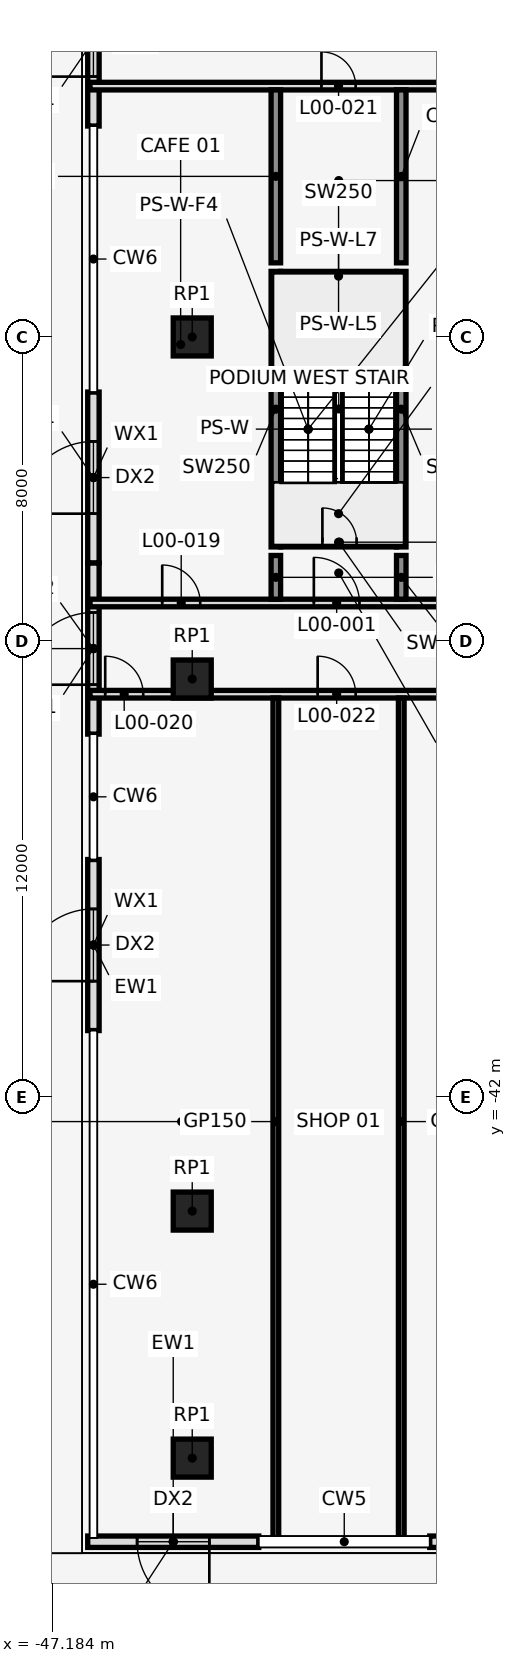
"""IFC4 building model, lengths in metres.
Left out: names, types, materials, properties, quantities, classifications, styles, units other than length and angle.
Written with IfcOpenShell. Run it as: python <this file> out.ifc"""

import sys

from ifc_helpers import new_model, si_unit, direction, frame, frame_2d, origin, origin_2d, place, context, subcontext, project, spatial, rectangle, extrude, element, fill, save


model = new_model("IFC4")
c1 = context("Model", 3, precision=1e-05, world=origin(), true_north=direction((0.0, 1.0)))
c2 = subcontext(c1, "Body", "Model", "MODEL_VIEW")
j1 = project(units=[si_unit("LENGTHUNIT", "METRE"), si_unit("PLANEANGLEUNIT", "RADIAN")], contexts=[c1])
p1 = place(None, origin())
s1 = spatial("IfcSite", under=j1, at=p1, CompositionType="ELEMENT")
p2 = place(p1, origin())
s2 = spatial("IfcBuilding", under=s1, at=p2, CompositionType="ELEMENT")
p3 = place(p2, origin())
s3 = spatial("IfcBuildingStorey", under=s2, at=p3, CompositionType="ELEMENT", Elevation=0.0)
for number, where, z_axis, x_axis in (
    (1, (-43.5, -22.0, 0.0), (0.0, 0.0, 1.0), (1.0, 0.0, 0.0)),
    (2, (-43.5, -31.0, 0.0), (0.0, 0.0, 1.0), (1.0, 0.0, 0.0)),
    (3, (-43.5, -45.0, 0.0), (0.0, 0.0, 1.0), (1.0, 0.0, 0.0)),
    (4, (-43.5, -51.5, 0.0), (0.0, 0.0, 1.0), (1.0, 0.0, 0.0)),
):
    element("IfcColumn", number, at=place(p3, frame(where, z_axis=z_axis, x_axis=x_axis)), inside=s3, PredefinedType="COLUMN", context=c2, shape_type="SweptSolid", body=[
        extrude(rectangle(XDim=1.0, YDim=1.0, at=origin_2d()), origin(), (0.0, 0.0, 1.0), 8.0),
    ])
p4 = place(p3, frame((-41.75, -53.7, 0.0), z_axis=(0.0, 0.0, 1.0), x_axis=(-1.0, 0.0, 0.0)))
e5 = element("IfcWall", 5, at=p4, inside=s3, PredefinedType="STANDARD", context=c2, shape_type="SweptSolid", body=[
    extrude(rectangle(XDim=4.5, YDim=0.3, at=frame_2d((2.25, 0.0))), origin(), (0.0, 0.0, 1.0), 7.7),
])
p5 = place(p4, frame((1.3, 0.0, 0.0)))
e6 = element("IfcOpeningElement", 6, at=p5, cuts=e5, PredefinedType="OPENING", context=c2, shape_type="SweptSolid", body=[
    extrude(rectangle(XDim=1.9, YDim=2.6, at=frame_2d((0.95, 1.3))), frame((0.0, 0.162, 0.0), z_axis=(0.0, -1.0, 0.0), x_axis=(1.0, 0.0, 0.0)), (0.0, 0.0, 1.0), 0.324),
])
p6 = place(p4, frame((1.3, 0.0, 3.3)))
e7 = element("IfcOpeningElement", 7, at=p6, cuts=e5, PredefinedType="OPENING", context=c2, shape_type="SweptSolid", body=[
    extrude(rectangle(XDim=1.9, YDim=3.0, at=frame_2d((0.95, 1.5))), frame((0.0, 0.162, 0.0), z_axis=(0.0, -1.0, 0.0), x_axis=(1.0, 0.0, 0.0)), (0.0, 0.0, 1.0), 0.324),
])
p7 = place(p3, frame((-32.75, -53.7, 0.0), z_axis=(0.0, 0.0, 1.0), x_axis=(-1.0, 0.0, 0.0)))
e8 = element("IfcWall", 8, at=p7, inside=s3, PredefinedType="STANDARD", context=c2, shape_type="SweptSolid", body=[
    extrude(rectangle(XDim=4.5, YDim=0.3, at=frame_2d((2.25, 0.0))), origin(), (0.0, 0.0, 1.0), 7.7),
])
p8 = place(p7, frame((1.3, 0.0, 0.0)))
e9 = element("IfcOpeningElement", 9, at=p8, cuts=e8, PredefinedType="OPENING", context=c2, shape_type="SweptSolid", body=[
    extrude(rectangle(XDim=1.9, YDim=2.6, at=frame_2d((0.95, 1.3))), frame((0.0, 0.162, 0.0), z_axis=(0.0, -1.0, 0.0), x_axis=(1.0, 0.0, 0.0)), (0.0, 0.0, 1.0), 0.324),
])
p9 = place(p7, frame((1.3, 0.0, 3.3)))
e10 = element("IfcOpeningElement", 10, at=p9, cuts=e8, PredefinedType="OPENING", context=c2, shape_type="SweptSolid", body=[
    extrude(rectangle(XDim=1.9, YDim=3.0, at=frame_2d((0.95, 1.5))), frame((0.0, 0.162, 0.0), z_axis=(0.0, -1.0, 0.0), x_axis=(1.0, 0.0, 0.0)), (0.0, 0.0, 1.0), 0.324),
])
p10 = place(p3, frame((-46.1, -16.45, 0.0), z_axis=(0.0, 0.0, 1.0), x_axis=(0.0, 1.0, 0.0)))
e11 = element("IfcWall", 11, at=p10, inside=s3, PredefinedType="STANDARD", context=c2, shape_type="SweptSolid", body=[
    extrude(rectangle(XDim=4.5, YDim=0.3, at=frame_2d((2.25, 0.0))), origin(), (0.0, 0.0, 1.0), 7.7),
])
p11 = place(p10, frame((1.3, 0.0, 0.0)))
e12 = element("IfcOpeningElement", 12, at=p11, cuts=e11, PredefinedType="OPENING", context=c2, shape_type="SweptSolid", body=[
    extrude(rectangle(XDim=1.9, YDim=2.6, at=frame_2d((0.95, 1.3))), frame((0.0, 0.162, 0.0), z_axis=(0.0, -1.0, 0.0), x_axis=(1.0, 0.0, 0.0)), (0.0, 0.0, 1.0), 0.324),
])
p12 = place(p10, frame((1.3, 0.0, 3.3)))
e13 = element("IfcOpeningElement", 13, at=p12, cuts=e11, PredefinedType="OPENING", context=c2, shape_type="SweptSolid", body=[
    extrude(rectangle(XDim=1.9, YDim=3.0, at=frame_2d((0.95, 1.5))), frame((0.0, 0.162, 0.0), z_axis=(0.0, -1.0, 0.0), x_axis=(1.0, 0.0, 0.0)), (0.0, 0.0, 1.0), 0.324),
])
p13 = place(p3, frame((-46.1, -27.95, 0.0), z_axis=(0.0, 0.0, 1.0), x_axis=(0.0, 1.0, 0.0)))
e14 = element("IfcWall", 14, at=p13, inside=s3, PredefinedType="STANDARD", context=c2, shape_type="SweptSolid", body=[
    extrude(rectangle(XDim=4.5, YDim=0.3, at=frame_2d((2.25, 0.0))), origin(), (0.0, 0.0, 1.0), 7.7),
])
p14 = place(p13, frame((1.3, 0.0, 0.0)))
e15 = element("IfcOpeningElement", 15, at=p14, cuts=e14, PredefinedType="OPENING", context=c2, shape_type="SweptSolid", body=[
    extrude(rectangle(XDim=1.9, YDim=2.6, at=frame_2d((0.95, 1.3))), frame((0.0, 0.162, 0.0), z_axis=(0.0, -1.0, 0.0), x_axis=(1.0, 0.0, 0.0)), (0.0, 0.0, 1.0), 0.324),
])
p15 = place(p13, frame((1.3, 0.0, 3.3)))
e16 = element("IfcOpeningElement", 16, at=p15, cuts=e14, PredefinedType="OPENING", context=c2, shape_type="SweptSolid", body=[
    extrude(rectangle(XDim=1.9, YDim=3.0, at=frame_2d((0.95, 1.5))), frame((0.0, 0.162, 0.0), z_axis=(0.0, -1.0, 0.0), x_axis=(1.0, 0.0, 0.0)), (0.0, 0.0, 1.0), 0.324),
])
p16 = place(p3, frame((-46.1, -32.45, 0.0), z_axis=(0.0, 0.0, 1.0), x_axis=(0.0, 1.0, 0.0)))
e17 = element("IfcWall", 17, at=p16, inside=s3, PredefinedType="STANDARD", context=c2, shape_type="SweptSolid", body=[
    extrude(rectangle(XDim=4.5, YDim=0.3, at=frame_2d((2.25, 0.0))), origin(), (0.0, 0.0, 1.0), 7.7),
])
p17 = place(p16, frame((1.3, 0.0, 0.0)))
e18 = element("IfcOpeningElement", 18, at=p17, cuts=e17, PredefinedType="OPENING", context=c2, shape_type="SweptSolid", body=[
    extrude(rectangle(XDim=1.9, YDim=2.6, at=frame_2d((0.95, 1.3))), frame((0.0, 0.162, 0.0), z_axis=(0.0, -1.0, 0.0), x_axis=(1.0, 0.0, 0.0)), (0.0, 0.0, 1.0), 0.324),
])
p18 = place(p16, frame((1.3, 0.0, 3.3)))
e19 = element("IfcOpeningElement", 19, at=p18, cuts=e17, PredefinedType="OPENING", context=c2, shape_type="SweptSolid", body=[
    extrude(rectangle(XDim=1.9, YDim=3.0, at=frame_2d((0.95, 1.5))), frame((0.0, 0.162, 0.0), z_axis=(0.0, -1.0, 0.0), x_axis=(1.0, 0.0, 0.0)), (0.0, 0.0, 1.0), 0.324),
])
p19 = place(p3, frame((-46.1, -40.25, 0.0), z_axis=(0.0, 0.0, 1.0), x_axis=(0.0, 1.0, 0.0)))
e20 = element("IfcWall", 20, at=p19, inside=s3, PredefinedType="STANDARD", context=c2, shape_type="SweptSolid", body=[
    extrude(rectangle(XDim=4.5, YDim=0.3, at=frame_2d((2.25, 0.0))), origin(), (0.0, 0.0, 1.0), 7.7),
])
p20 = place(p19, frame((1.3, 0.0, 0.0)))
e21 = element("IfcOpeningElement", 21, at=p20, cuts=e20, PredefinedType="OPENING", context=c2, shape_type="SweptSolid", body=[
    extrude(rectangle(XDim=1.9, YDim=2.6, at=frame_2d((0.95, 1.3))), frame((0.0, 0.162, 0.0), z_axis=(0.0, -1.0, 0.0), x_axis=(1.0, 0.0, 0.0)), (0.0, 0.0, 1.0), 0.324),
])
p21 = place(p19, frame((1.3, 0.0, 3.3)))
e22 = element("IfcOpeningElement", 22, at=p21, cuts=e20, PredefinedType="OPENING", context=c2, shape_type="SweptSolid", body=[
    extrude(rectangle(XDim=1.9, YDim=3.0, at=frame_2d((0.95, 1.5))), frame((0.0, 0.162, 0.0), z_axis=(0.0, -1.0, 0.0), x_axis=(1.0, 0.0, 0.0)), (0.0, 0.0, 1.0), 0.324),
])
for number, where, z_axis, x_axis in (
    (23, (-41.3, -27.525, 0.0), (0.0, 0.0, 1.0), (0.0, 1.0, 0.0)),
    (24, (-38.0, -27.525, 0.0), (0.0, 0.0, 1.0), (0.0, 1.0, 0.0)),
):
    element("IfcWall", number, at=place(p3, frame(where, z_axis=z_axis, x_axis=x_axis)), inside=s3, PredefinedType="SHEAR", context=c2, shape_type="SweptSolid", body=[
        extrude(rectangle(XDim=7.25, YDim=0.25, at=frame_2d((3.625, 0.0))), origin(), (0.0, 0.0, 1.0), 8.0),
    ])
p22 = place(p3, frame((-41.175, -27.4, 0.0), z_axis=(0.0, 0.0, 1.0), x_axis=(1.0, 0.0, 0.0)))
e25 = element("IfcWall", 25, at=p22, inside=s3, PredefinedType="SHEAR", context=c2, shape_type="SweptSolid", body=[
    extrude(rectangle(XDim=3.05, YDim=0.25, at=frame_2d((1.525, 0.0))), origin(), (0.0, 0.0, 1.0), 8.0),
])
p23 = place(p22, frame((1.1, 0.0, 0.0)))
e26 = element("IfcOpeningElement", 26, at=p23, cuts=e25, PredefinedType="OPENING", context=c2, shape_type="SweptSolid", body=[
    extrude(rectangle(XDim=0.9, YDim=2.1, at=frame_2d((0.45, 1.05))), frame((0.0, 0.137, 0.0), z_axis=(0.0, -1.0, 0.0), x_axis=(1.0, 0.0, 0.0)), (0.0, 0.0, 1.0), 0.274),
])
p24 = place(p3, frame((-41.175, -20.4, 0.0), z_axis=(0.0, 0.0, 1.0), x_axis=(1.0, 0.0, 0.0)))
e27 = element("IfcWall", 27, at=p24, inside=s3, PredefinedType="SHEAR", context=c2, shape_type="SweptSolid", body=[
    extrude(rectangle(XDim=3.05, YDim=0.25, at=frame_2d((1.525, 0.0))), origin(), (0.0, 0.0, 1.0), 8.0),
])
p25 = place(p3, frame((-46.19, -31.4, 0.0), z_axis=(0.0, 0.0, 1.0), x_axis=(1.0, 0.0, 0.0)))
e28 = element("IfcWall", 28, at=p25, inside=s3, PredefinedType="PARTITIONING", context=c2, shape_type="SweptSolid", body=[
    extrude(rectangle(XDim=26.59, YDim=0.2, at=frame_2d((13.295, 0.0))), origin(), (0.0, 0.0, 1.0), 7.7),
])
p26 = place(p25, frame((0.4, 0.0, 0.0)))
e29 = element("IfcOpeningElement", 29, at=p26, cuts=e28, PredefinedType="OPENING", context=c2, shape_type="SweptSolid", body=[
    extrude(rectangle(XDim=1.0, YDim=2.1, at=frame_2d((0.5, 1.05))), frame((0.0, 0.112, 0.0), z_axis=(0.0, -1.0, 0.0), x_axis=(1.0, 0.0, 0.0)), (0.0, 0.0, 1.0), 0.224),
])
p27 = place(p25, frame((5.99, 0.0, 0.0)))
e30 = element("IfcOpeningElement", 30, at=p27, cuts=e28, PredefinedType="OPENING", context=c2, shape_type="SweptSolid", body=[
    extrude(rectangle(XDim=1.0, YDim=2.1, at=frame_2d((0.5, 1.05))), frame((0.0, 0.112, 0.0), z_axis=(0.0, -1.0, 0.0), x_axis=(1.0, 0.0, 0.0)), (0.0, 0.0, 1.0), 0.224),
])
p28 = place(p25, frame((14.79, 0.0, 0.0)))
e31 = element("IfcOpeningElement", 31, at=p28, cuts=e28, PredefinedType="OPENING", context=c2, shape_type="SweptSolid", body=[
    extrude(rectangle(XDim=1.8, YDim=2.1, at=frame_2d((0.9, 1.05))), frame((0.0, 0.112, 0.0), z_axis=(0.0, -1.0, 0.0), x_axis=(1.0, 0.0, 0.0)), (0.0, 0.0, 1.0), 0.224),
])
p29 = place(p3, frame((-46.19, -29.0, 0.0), z_axis=(0.0, 0.0, 1.0), x_axis=(1.0, 0.0, 0.0)))
e32 = element("IfcWall", 32, at=p29, inside=s3, PredefinedType="PARTITIONING", context=c2, shape_type="SweptSolid", body=[
    extrude(rectangle(XDim=26.615, YDim=0.2, at=frame_2d((13.308, 0.0))), origin(), (0.0, 0.0, 1.0), 7.7),
])
p30 = place(p29, frame((5.89, 0.0, 0.0)))
e33 = element("IfcOpeningElement", 33, at=p30, cuts=e32, PredefinedType="OPENING", context=c2, shape_type="SweptSolid", body=[
    extrude(rectangle(XDim=1.2, YDim=2.1, at=frame_2d((0.6, 1.05))), frame((0.0, 0.112, 0.0), z_axis=(0.0, -1.0, 0.0), x_axis=(1.0, 0.0, 0.0)), (0.0, 0.0, 1.0), 0.224),
])
p31 = place(p29, frame((24.19, 0.0, 0.0)))
e34 = element("IfcOpeningElement", 34, at=p31, cuts=e32, PredefinedType="OPENING", context=c2, shape_type="SweptSolid", body=[
    extrude(rectangle(XDim=1.2, YDim=2.1, at=frame_2d((0.6, 1.05))), frame((0.0, 0.112, 0.0), z_axis=(0.0, -1.0, 0.0), x_axis=(1.0, 0.0, 0.0)), (0.0, 0.0, 1.0), 0.224),
])
p32 = place(p29, frame((1.9, 0.0, 0.0)))
e35 = element("IfcOpeningElement", 35, at=p32, cuts=e32, PredefinedType="OPENING", context=c2, shape_type="SweptSolid", body=[
    extrude(rectangle(XDim=1.0, YDim=2.1, at=frame_2d((0.5, 1.05))), frame((0.0, 0.112, 0.0), z_axis=(0.0, -1.0, 0.0), x_axis=(1.0, 0.0, 0.0)), (0.0, 0.0, 1.0), 0.224),
])
p33 = place(p29, frame((15.19, 0.0, 0.0)))
e36 = element("IfcOpeningElement", 36, at=p33, cuts=e32, PredefinedType="OPENING", context=c2, shape_type="SweptSolid", body=[
    extrude(rectangle(XDim=1.0, YDim=2.1, at=frame_2d((0.5, 1.05))), frame((0.0, 0.112, 0.0), z_axis=(0.0, -1.0, 0.0), x_axis=(1.0, 0.0, 0.0)), (0.0, 0.0, 1.0), 0.224),
])
p34 = place(p3, frame((-46.19, -15.4, 0.0), z_axis=(0.0, 0.0, 1.0), x_axis=(1.0, 0.0, 0.0)))
e37 = element("IfcWall", 37, at=p34, inside=s3, PredefinedType="PARTITIONING", context=c2, shape_type="SweptSolid", body=[
    extrude(rectangle(XDim=26.615, YDim=0.2, at=frame_2d((13.308, 0.0))), origin(), (0.0, 0.0, 1.0), 7.7),
])
p35 = place(p34, frame((6.09, 0.0, 0.0)))
e38 = element("IfcOpeningElement", 38, at=p35, cuts=e37, PredefinedType="OPENING", context=c2, shape_type="SweptSolid", body=[
    extrude(rectangle(XDim=0.9, YDim=2.1, at=frame_2d((0.45, 1.05))), frame((0.0, 0.112, 0.0), z_axis=(0.0, -1.0, 0.0), x_axis=(1.0, 0.0, 0.0)), (0.0, 0.0, 1.0), 0.224),
])
p36 = place(p3, frame((-41.3, -53.79, 0.0), z_axis=(0.0, 0.0, 1.0), x_axis=(0.0, 1.0, 0.0)))
e39 = element("IfcWall", 39, at=p36, inside=s3, PredefinedType="PARTITIONING", context=c2, shape_type="SweptSolid", body=[
    extrude(rectangle(XDim=22.29, YDim=0.15, at=frame_2d((11.145, 0.0))), origin(), (0.0, 0.0, 1.0), 7.7),
])
p37 = place(p3, frame((-41.3, -28.9, 0.0), z_axis=(0.0, 0.0, 1.0), x_axis=(0.0, 1.0, 0.0)))
e40 = element("IfcWall", 40, at=p37, inside=s3, PredefinedType="SHEAR", context=c2, shape_type="SweptSolid", body=[
    extrude(rectangle(XDim=1.15, YDim=0.25, at=frame_2d((0.575, 0.0))), origin(), (0.0, 0.0, 1.0), 8.0),
])
p38 = place(p3, frame((-41.3, -20.05, 0.0), z_axis=(0.0, 0.0, 1.0), x_axis=(0.0, 1.0, 0.0)))
e41 = element("IfcWall", 41, at=p38, inside=s3, PredefinedType="SHEAR", context=c2, shape_type="SweptSolid", body=[
    extrude(rectangle(XDim=4.55, YDim=0.25, at=frame_2d((2.275, 0.0))), origin(), (0.0, 0.0, 1.0), 8.0),
])
p39 = place(p3, frame((-38.0, -53.79, 0.0), z_axis=(0.0, 0.0, 1.0), x_axis=(0.0, 1.0, 0.0)))
e42 = element("IfcWall", 42, at=p39, inside=s3, PredefinedType="PARTITIONING", context=c2, shape_type="SweptSolid", body=[
    extrude(rectangle(XDim=22.29, YDim=0.15, at=frame_2d((11.145, 0.0))), origin(), (0.0, 0.0, 1.0), 7.7),
])
p40 = place(p3, frame((-38.0, -28.9, 0.0), z_axis=(0.0, 0.0, 1.0), x_axis=(0.0, 1.0, 0.0)))
e43 = element("IfcWall", 43, at=p40, inside=s3, PredefinedType="SHEAR", context=c2, shape_type="SweptSolid", body=[
    extrude(rectangle(XDim=1.15, YDim=0.25, at=frame_2d((0.575, 0.0))), origin(), (0.0, 0.0, 1.0), 8.0),
])
p41 = place(p3, frame((-38.0, -20.05, 0.0), z_axis=(0.0, 0.0, 1.0), x_axis=(0.0, 1.0, 0.0)))
e44 = element("IfcWall", 44, at=p41, inside=s3, PredefinedType="SHEAR", context=c2, shape_type="SweptSolid", body=[
    extrude(rectangle(XDim=4.55, YDim=0.25, at=frame_2d((2.275, 0.0))), origin(), (0.0, 0.0, 1.0), 8.0),
])
p42 = place(p5, origin())
e45 = element("IfcDoor", 45, at=p42, inside=s3, OperationType="SINGLE_SWING_LEFT", PredefinedType="DOOR", context=c2, shape_type="SweptSolid", body=[
    extrude(rectangle(XDim=1.9, YDim=2.6, at=frame_2d((0.95, 1.3))), frame((0.0, 0.025, 0.0), z_axis=(0.0, -1.0, 0.0), x_axis=(1.0, 0.0, 0.0)), (0.0, 0.0, 1.0), 0.05),
])
fill(e6, e45)
p43 = place(p6, origin())
e46 = element("IfcWindow", 46, at=p43, inside=s3, PartitioningType="SINGLE_PANEL", PredefinedType="WINDOW", context=c2, shape_type="SweptSolid", body=[
    extrude(rectangle(XDim=1.9, YDim=3.0, at=frame_2d((0.95, 1.5))), frame((0.0, 0.03, 0.0), z_axis=(0.0, -1.0, 0.0), x_axis=(1.0, 0.0, 0.0)), (0.0, 0.0, 1.0), 0.06),
])
fill(e7, e46)
p44 = place(p11, origin())
e47 = element("IfcDoor", 47, at=p44, inside=s3, OperationType="SINGLE_SWING_LEFT", PredefinedType="DOOR", context=c2, shape_type="SweptSolid", body=[
    extrude(rectangle(XDim=1.9, YDim=2.6, at=frame_2d((0.95, 1.3))), frame((0.0, 0.025, 0.0), z_axis=(0.0, -1.0, 0.0), x_axis=(1.0, 0.0, 0.0)), (0.0, 0.0, 1.0), 0.05),
])
fill(e12, e47)
p45 = place(p12, origin())
e48 = element("IfcWindow", 48, at=p45, inside=s3, PartitioningType="SINGLE_PANEL", PredefinedType="WINDOW", context=c2, shape_type="SweptSolid", body=[
    extrude(rectangle(XDim=1.9, YDim=3.0, at=frame_2d((0.95, 1.5))), frame((0.0, 0.03, 0.0), z_axis=(0.0, -1.0, 0.0), x_axis=(1.0, 0.0, 0.0)), (0.0, 0.0, 1.0), 0.06),
])
fill(e13, e48)
p46 = place(p14, origin())
e49 = element("IfcDoor", 49, at=p46, inside=s3, OperationType="SINGLE_SWING_LEFT", PredefinedType="DOOR", context=c2, shape_type="SweptSolid", body=[
    extrude(rectangle(XDim=1.9, YDim=2.6, at=frame_2d((0.95, 1.3))), frame((0.0, 0.025, 0.0), z_axis=(0.0, -1.0, 0.0), x_axis=(1.0, 0.0, 0.0)), (0.0, 0.0, 1.0), 0.05),
])
fill(e15, e49)
p47 = place(p15, origin())
e50 = element("IfcWindow", 50, at=p47, inside=s3, PartitioningType="SINGLE_PANEL", PredefinedType="WINDOW", context=c2, shape_type="SweptSolid", body=[
    extrude(rectangle(XDim=1.9, YDim=3.0, at=frame_2d((0.95, 1.5))), frame((0.0, 0.03, 0.0), z_axis=(0.0, -1.0, 0.0), x_axis=(1.0, 0.0, 0.0)), (0.0, 0.0, 1.0), 0.06),
])
fill(e16, e50)
p48 = place(p17, origin())
e51 = element("IfcDoor", 51, at=p48, inside=s3, OperationType="SINGLE_SWING_LEFT", PredefinedType="DOOR", context=c2, shape_type="SweptSolid", body=[
    extrude(rectangle(XDim=1.9, YDim=2.6, at=frame_2d((0.95, 1.3))), frame((0.0, 0.025, 0.0), z_axis=(0.0, -1.0, 0.0), x_axis=(1.0, 0.0, 0.0)), (0.0, 0.0, 1.0), 0.05),
])
fill(e18, e51)
p49 = place(p18, origin())
e52 = element("IfcWindow", 52, at=p49, inside=s3, PartitioningType="SINGLE_PANEL", PredefinedType="WINDOW", context=c2, shape_type="SweptSolid", body=[
    extrude(rectangle(XDim=1.9, YDim=3.0, at=frame_2d((0.95, 1.5))), frame((0.0, 0.03, 0.0), z_axis=(0.0, -1.0, 0.0), x_axis=(1.0, 0.0, 0.0)), (0.0, 0.0, 1.0), 0.06),
])
fill(e19, e52)
p50 = place(p20, origin())
e53 = element("IfcDoor", 53, at=p50, inside=s3, OperationType="SINGLE_SWING_LEFT", PredefinedType="DOOR", context=c2, shape_type="SweptSolid", body=[
    extrude(rectangle(XDim=1.9, YDim=2.6, at=frame_2d((0.95, 1.3))), frame((0.0, 0.025, 0.0), z_axis=(0.0, -1.0, 0.0), x_axis=(1.0, 0.0, 0.0)), (0.0, 0.0, 1.0), 0.05),
])
fill(e21, e53)
p51 = place(p21, origin())
e54 = element("IfcWindow", 54, at=p51, inside=s3, PartitioningType="SINGLE_PANEL", PredefinedType="WINDOW", context=c2, shape_type="SweptSolid", body=[
    extrude(rectangle(XDim=1.9, YDim=3.0, at=frame_2d((0.95, 1.5))), frame((0.0, 0.03, 0.0), z_axis=(0.0, -1.0, 0.0), x_axis=(1.0, 0.0, 0.0)), (0.0, 0.0, 1.0), 0.06),
])
fill(e22, e54)
p52 = place(p30, origin())
e55 = element("IfcDoor", 55, at=p52, inside=s3, OperationType="SINGLE_SWING_LEFT", PredefinedType="DOOR", context=c2, shape_type="SweptSolid", body=[
    extrude(rectangle(XDim=1.2, YDim=2.1, at=frame_2d((0.6, 1.05))), frame((0.0, 0.025, 0.0), z_axis=(0.0, -1.0, 0.0), x_axis=(1.0, 0.0, 0.0)), (0.0, 0.0, 1.0), 0.05),
])
fill(e33, e55)
p53 = place(p23, origin())
e56 = element("IfcDoor", 56, at=p53, inside=s3, OperationType="SINGLE_SWING_LEFT", PredefinedType="DOOR", context=c2, shape_type="SweptSolid", body=[
    extrude(rectangle(XDim=0.9, YDim=2.1, at=frame_2d((0.45, 1.05))), frame((0.0, 0.025, 0.0), z_axis=(0.0, -1.0, 0.0), x_axis=(1.0, 0.0, 0.0)), (0.0, 0.0, 1.0), 0.05),
])
fill(e26, e56)
p54 = place(p32, origin())
e57 = element("IfcDoor", 57, at=p54, inside=s3, OperationType="SINGLE_SWING_LEFT", PredefinedType="DOOR", context=c2, shape_type="SweptSolid", body=[
    extrude(rectangle(XDim=1.0, YDim=2.1, at=frame_2d((0.5, 1.05))), frame((0.0, 0.025, 0.0), z_axis=(0.0, -1.0, 0.0), x_axis=(1.0, 0.0, 0.0)), (0.0, 0.0, 1.0), 0.05),
])
fill(e35, e57)
p55 = place(p26, frame((1.0, 0.0, 0.0), z_axis=(0.0, 0.0, 1.0), x_axis=(-1.0, 0.0, 0.0)))
e58 = element("IfcDoor", 58, at=p55, inside=s3, OperationType="SINGLE_SWING_RIGHT", PredefinedType="DOOR", context=c2, shape_type="SweptSolid", body=[
    extrude(rectangle(XDim=1.0, YDim=2.1, at=frame_2d((0.5, 1.05))), frame((0.0, 0.025, 0.0), z_axis=(0.0, -1.0, 0.0), x_axis=(1.0, 0.0, 0.0)), (0.0, 0.0, 1.0), 0.05),
])
fill(e29, e58)
p56 = place(p35, frame((0.9, 0.0, 0.0), z_axis=(0.0, 0.0, 1.0), x_axis=(-1.0, 0.0, 0.0)))
e59 = element("IfcDoor", 59, at=p56, inside=s3, OperationType="SINGLE_SWING_RIGHT", PredefinedType="DOOR", context=c2, shape_type="SweptSolid", body=[
    extrude(rectangle(XDim=0.9, YDim=2.1, at=frame_2d((0.45, 1.05))), frame((0.0, 0.025, 0.0), z_axis=(0.0, -1.0, 0.0), x_axis=(1.0, 0.0, 0.0)), (0.0, 0.0, 1.0), 0.05),
])
fill(e38, e59)
p57 = place(p27, frame((1.0, 0.0, 0.0), z_axis=(0.0, 0.0, 1.0), x_axis=(-1.0, 0.0, 0.0)))
e60 = element("IfcDoor", 60, at=p57, inside=s3, OperationType="SINGLE_SWING_LEFT", PredefinedType="DOOR", context=c2, shape_type="SweptSolid", body=[
    extrude(rectangle(XDim=1.0, YDim=2.1, at=frame_2d((0.5, 1.05))), frame((0.0, 0.025, 0.0), z_axis=(0.0, -1.0, 0.0), x_axis=(1.0, 0.0, 0.0)), (0.0, 0.0, 1.0), 0.05),
])
fill(e30, e60)
save(model, sys.argv[1])
